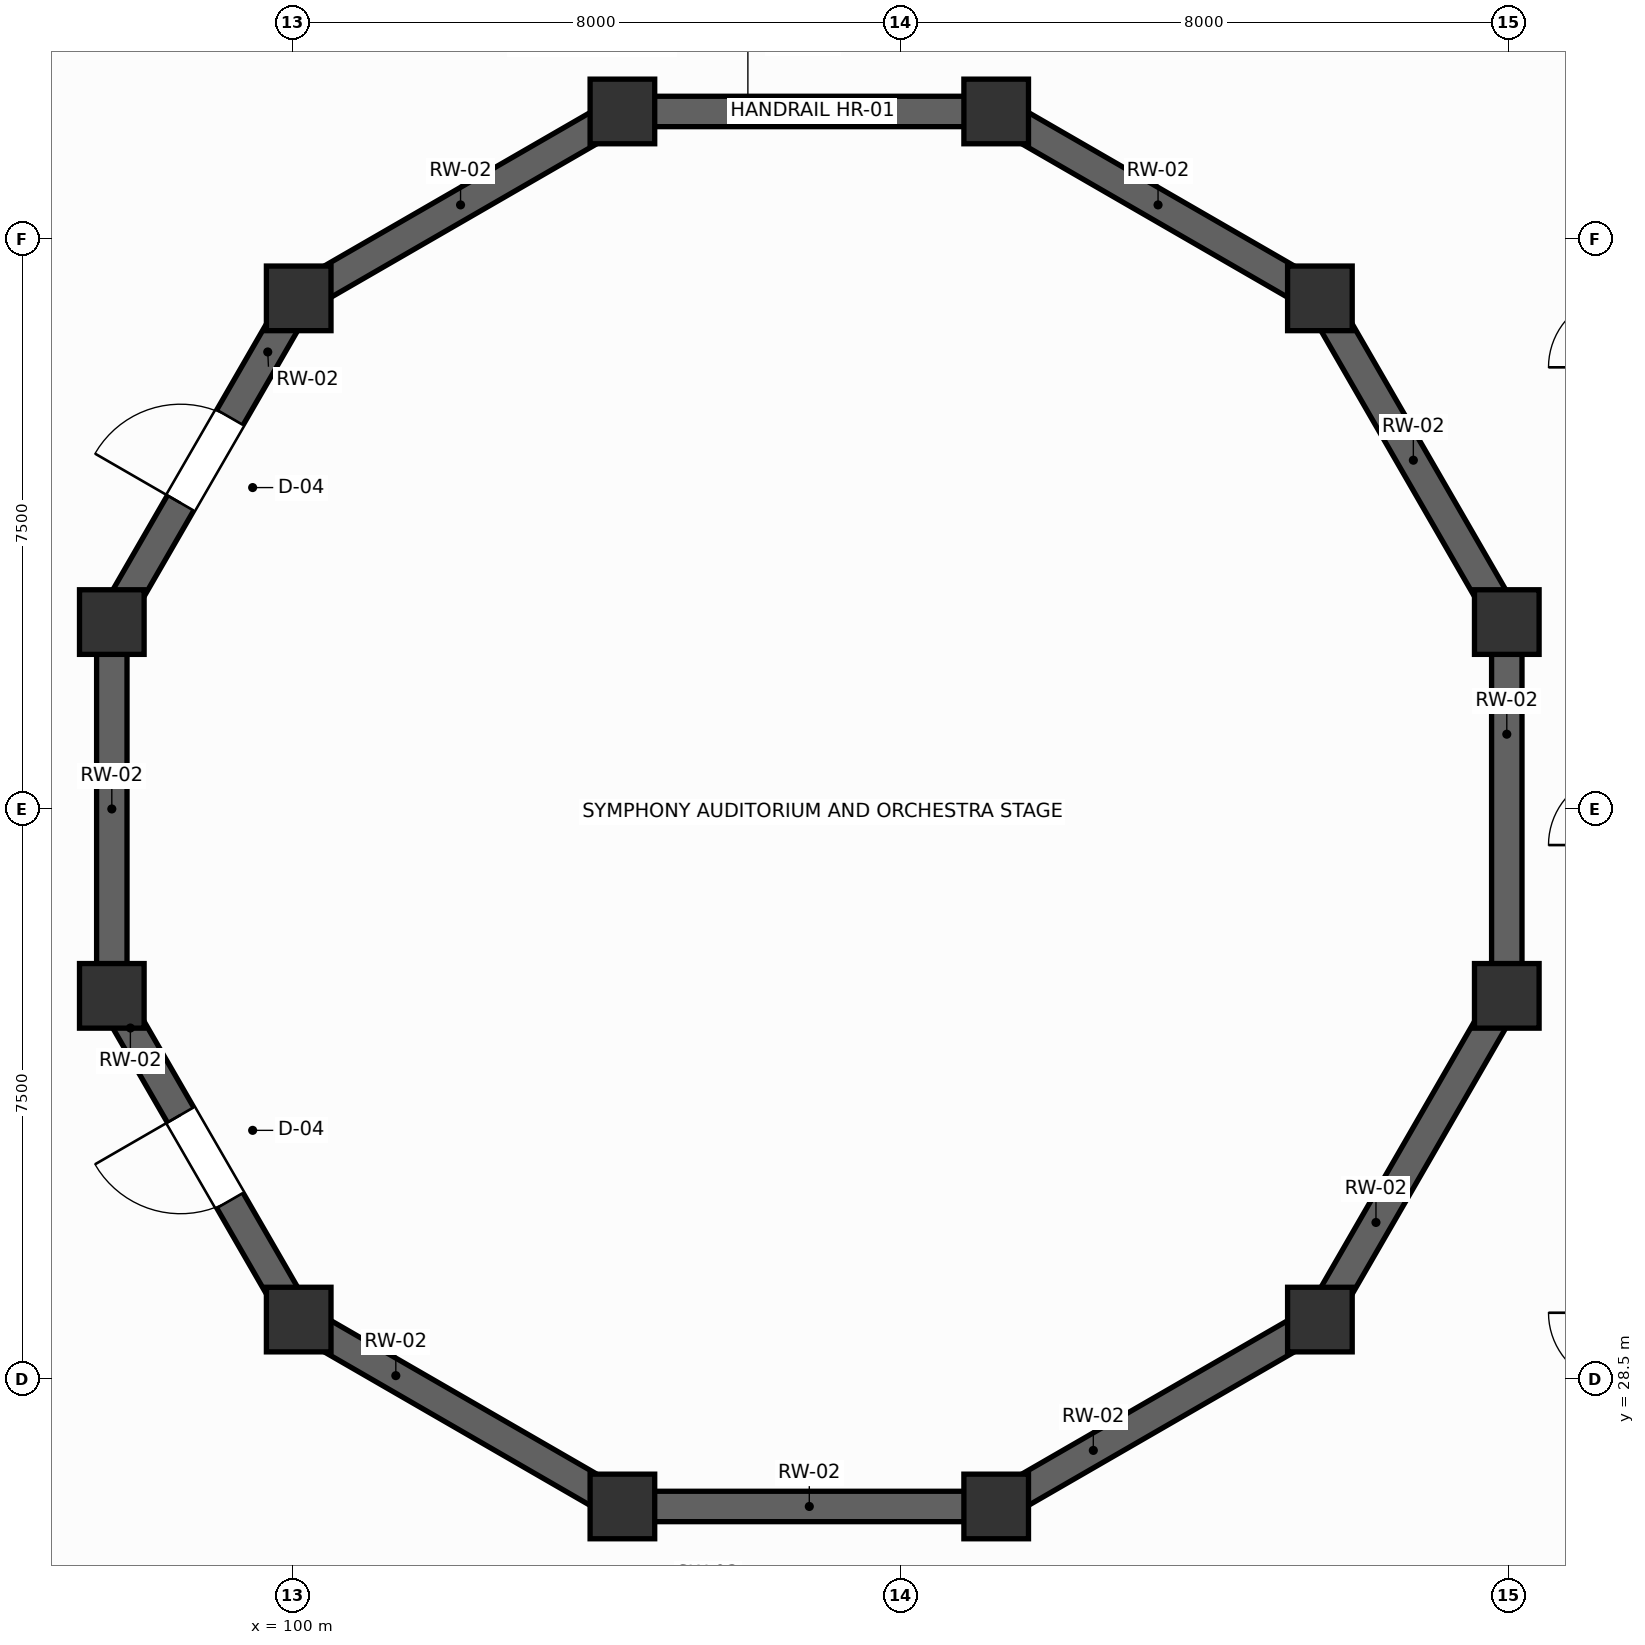
"""IFC4 building model, lengths in metres.
Left out: names, types, materials, properties, quantities, classifications, styles, units other than length and angle.
Written with IfcOpenShell. Run it as: python <this file> out.ifc"""

import sys

from ifc_helpers import new_model, si_unit, direction, frame, frame_2d, origin, origin_2d, place, context, subcontext, project, spatial, rectangle, extrude, source, transform, mapped, element, fill, save


model = new_model("IFC4")
c1 = context("Model", 3, precision=1e-05, world=origin(), true_north=direction((0.0, 1.0)))
c2 = subcontext(c1, "Body", "Model", "MODEL_VIEW")
j1 = project(units=[si_unit("LENGTHUNIT", "METRE"), si_unit("PLANEANGLEUNIT", "RADIAN")], contexts=[c1])
p1 = place(None, origin())
s1 = spatial("IfcSite", under=j1, at=p1, CompositionType="ELEMENT")
p2 = place(p1, origin())
s2 = spatial("IfcBuilding", under=s1, at=p2, CompositionType="ELEMENT")
p3 = place(p2, frame((0.0, 0.0, 4.8)))
s3 = spatial("IfcBuildingStorey", under=s2, at=p3, CompositionType="ELEMENT", Elevation=4.8)
m1 = source(origin(), c2, "Body", "SweptSolid", [
    extrude(rectangle(XDim=0.85, YDim=0.85, at=origin_2d()), origin(), (0.0, 0.0, 1.0), 4.8),
])
for number, where, z_axis, x_axis in (
    (1, (115.976, 38.459, 0.0), (0.0, 0.0, 1.0), (1.0, 0.0, 0.0)),
    (2, (113.518, 42.718, 0.0), (0.0, 0.0, 1.0), (1.0, 0.0, 0.0)),
    (3, (109.259, 45.176, 0.0), (0.0, 0.0, 1.0), (1.0, 0.0, 0.0)),
    (4, (104.341, 45.176, 0.0), (0.0, 0.0, 1.0), (1.0, 0.0, 0.0)),
    (5, (100.083, 42.718, 0.0), (0.0, 0.0, 1.0), (1.0, 0.0, 0.0)),
    (6, (97.624, 38.459, 0.0), (0.0, 0.0, 1.0), (1.0, 0.0, 0.0)),
    (7, (97.624, 33.541, 0.0), (0.0, 0.0, 1.0), (1.0, 0.0, 0.0)),
    (8, (100.083, 29.282, 0.0), (0.0, 0.0, 1.0), (1.0, 0.0, 0.0)),
    (9, (104.341, 26.824, 0.0), (0.0, 0.0, 1.0), (1.0, 0.0, 0.0)),
    (10, (109.259, 26.824, 0.0), (0.0, 0.0, 1.0), (1.0, 0.0, 0.0)),
    (11, (113.518, 29.282, 0.0), (0.0, 0.0, 1.0), (1.0, 0.0, 0.0)),
    (12, (115.976, 33.541, 0.0), (0.0, 0.0, 1.0), (1.0, 0.0, 0.0)),
):
    element("IfcColumn", number, at=place(p3, frame(where, z_axis=z_axis, x_axis=x_axis)), inside=s3, PredefinedType="COLUMN", context=c2, shape_type="MappedRepresentation", body=[
        mapped(m1, transform((0.0, 0.0, 0.0), scale=1.0)),
    ])
for number, where, z_axis, x_axis in (
    (13, (115.976, 38.459, 0.0), (0.0, 0.0, 1.0), (-0.5, 0.866, 0.0)),
    (14, (113.518, 42.718, 0.0), (0.0, 0.0, 1.0), (-0.866, 0.5, 0.0)),
    (15, (109.259, 45.176, 0.0), (0.0, 0.0, 1.0), (-1.0, 0.0, 0.0)),
    (16, (104.341, 45.176, 0.0), (0.0, 0.0, 1.0), (-0.866, -0.5, 0.0)),
):
    element("IfcWall", number, at=place(p3, frame(where, z_axis=z_axis, x_axis=x_axis)), inside=s3, PredefinedType="SOLIDWALL", context=c2, shape_type="SweptSolid", body=[
        extrude(rectangle(XDim=4.917, YDim=0.4, at=frame_2d((2.459, 0.0))), origin(), (0.0, 0.0, 1.0), 4.8),
    ])
p4 = place(p3, frame((100.083, 42.718, 0.0), z_axis=(0.0, 0.0, 1.0), x_axis=(-0.499988900423, -0.866031812033, 0.0)))
e17 = element("IfcWall", 17, at=p4, inside=s3, PredefinedType="SOLIDWALL", context=c2, shape_type="SweptSolid", body=[
    extrude(rectangle(XDim=4.917, YDim=0.4, at=frame_2d((2.459, 0.0))), origin(), (0.0, 0.0, 1.0), 4.8),
])
p5 = place(p4, frame((1.809, 0.0, 0.0)))
e18 = element("IfcOpeningElement", 18, at=p5, cuts=e17, PredefinedType="OPENING", context=c2, shape_type="SweptSolid", body=[
    extrude(rectangle(XDim=1.3, YDim=2.1, at=frame_2d((0.65, 1.05))), frame((0.0, 0.21, 0.0), z_axis=(0.0, -1.0, 0.0), x_axis=(1.0, 0.0, 0.0)), (0.0, 0.0, 1.0), 0.42),
])
p6 = place(p3, frame((97.624, 38.459, 0.0), z_axis=(0.0, 0.0, 1.0), x_axis=(0.0, -1.0, 0.0)))
e19 = element("IfcWall", 19, at=p6, inside=s3, PredefinedType="SOLIDWALL", context=c2, shape_type="SweptSolid", body=[
    extrude(rectangle(XDim=4.917, YDim=0.4, at=frame_2d((2.459, 0.0))), origin(), (0.0, 0.0, 1.0), 4.8),
])
p7 = place(p3, frame((97.624, 33.541, 0.0), z_axis=(0.0, 0.0, 1.0), x_axis=(0.499988900423, -0.866031812033, 0.0)))
e20 = element("IfcWall", 20, at=p7, inside=s3, PredefinedType="SOLIDWALL", context=c2, shape_type="SweptSolid", body=[
    extrude(rectangle(XDim=4.917, YDim=0.4, at=frame_2d((2.459, 0.0))), origin(), (0.0, 0.0, 1.0), 4.8),
])
p8 = place(p7, frame((1.809, 0.0, 0.0)))
e21 = element("IfcOpeningElement", 21, at=p8, cuts=e20, PredefinedType="OPENING", context=c2, shape_type="SweptSolid", body=[
    extrude(rectangle(XDim=1.3, YDim=2.1, at=frame_2d((0.65, 1.05))), frame((0.0, 0.21, 0.0), z_axis=(0.0, -1.0, 0.0), x_axis=(1.0, 0.0, 0.0)), (0.0, 0.0, 1.0), 0.42),
])
for number, where, z_axis, x_axis in (
    (22, (100.083, 29.282, 0.0), (0.0, 0.0, 1.0), (0.866, -0.5, 0.0)),
    (23, (104.341, 26.824, 0.0), (0.0, 0.0, 1.0), (1.0, 0.0, 0.0)),
    (24, (109.259, 26.824, 0.0), (0.0, 0.0, 1.0), (0.866, 0.5, 0.0)),
    (25, (113.518, 29.282, 0.0), (0.0, 0.0, 1.0), (0.5, 0.866, 0.0)),
    (26, (115.976, 33.541, 0.0), (0.0, 0.0, 1.0), (0.0, 1.0, 0.0)),
):
    element("IfcWall", number, at=place(p3, frame(where, z_axis=z_axis, x_axis=x_axis)), inside=s3, PredefinedType="SOLIDWALL", context=c2, shape_type="SweptSolid", body=[
        extrude(rectangle(XDim=4.917, YDim=0.4, at=frame_2d((2.459, 0.0))), origin(), (0.0, 0.0, 1.0), 4.8),
    ])
p9 = place(p5, frame((1.3, 0.0, 0.0), z_axis=(0.0, 0.0, 1.0), x_axis=(-1.0, 0.0, 0.0)))
e27 = element("IfcDoor", 27, at=p9, inside=s3, OperationType="SINGLE_SWING_LEFT", PredefinedType="DOOR", context=c2, shape_type="SweptSolid", body=[
    extrude(rectangle(XDim=1.3, YDim=2.1, at=frame_2d((0.65, 1.05))), frame((0.0, 0.025, 0.0), z_axis=(0.0, -1.0, 0.0), x_axis=(1.0, 0.0, 0.0)), (0.0, 0.0, 1.0), 0.05),
])
fill(e18, e27)
p10 = place(p8, frame((1.3, 0.0, 0.0), z_axis=(0.0, 0.0, 1.0), x_axis=(-1.0, 0.0, 0.0)))
e28 = element("IfcDoor", 28, at=p10, inside=s3, OperationType="SINGLE_SWING_RIGHT", PredefinedType="DOOR", context=c2, shape_type="SweptSolid", body=[
    extrude(rectangle(XDim=1.3, YDim=2.1, at=frame_2d((0.65, 1.05))), frame((0.0, 0.025, 0.0), z_axis=(0.0, -1.0, 0.0), x_axis=(1.0, 0.0, 0.0)), (0.0, 0.0, 1.0), 0.05),
])
fill(e21, e28)
save(model, sys.argv[1])
